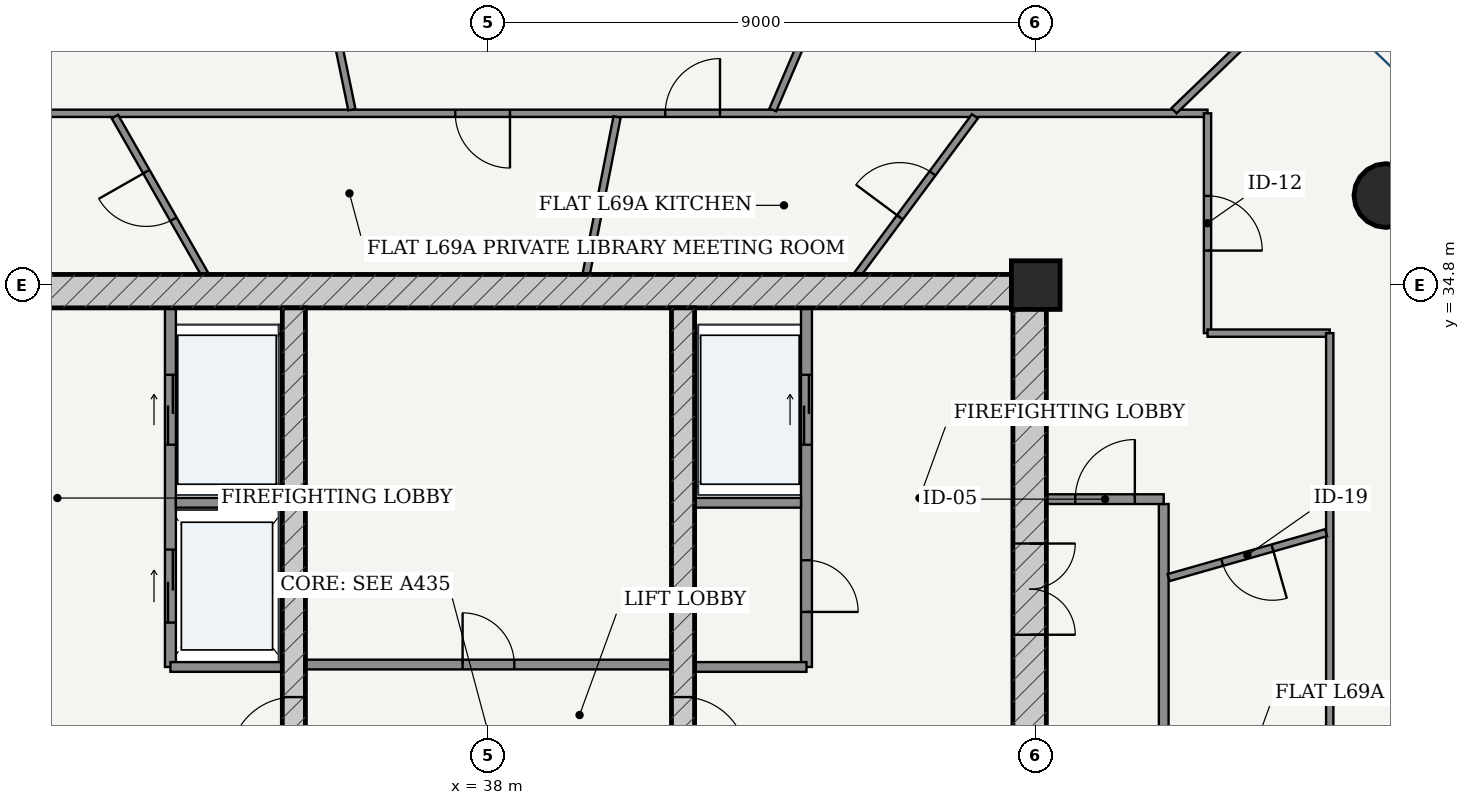
"""IFC4 building model, lengths in metres.
Left out: names, types, materials, properties, quantities, classifications, styles, units other than length and angle.
Written with IfcOpenShell. Run it as: python <this file> out.ifc"""

import sys

from ifc_helpers import new_model, si_unit, direction, frame, frame_2d, origin, origin_2d, place, context, subcontext, project, spatial, rectangle, hollow_circle, extrude, source, transform, mapped, element, fill, save


model = new_model("IFC4")
c1 = context("Model", 3, precision=1e-05, world=origin(), true_north=direction((-0.2419218956, 0.970295726276)))
c2 = subcontext(c1, "Body", "Model", "MODEL_VIEW")
j1 = project(units=[si_unit("LENGTHUNIT", "METRE"), si_unit("PLANEANGLEUNIT", "RADIAN")], contexts=[c1])
p1 = place(None, origin())
s1 = spatial("IfcSite", under=j1, at=p1, CompositionType="ELEMENT")
p2 = place(p1, origin())
s2 = spatial("IfcBuilding", under=s1, at=p2, CompositionType="ELEMENT")
p3 = place(p2, frame((0.0, 0.0, 263.2)))
s3 = spatial("IfcBuildingStorey", under=s2, at=p3, CompositionType="ELEMENT", Elevation=263.2)
p4 = place(p3, frame((47.0, 34.8, 0.0), z_axis=(0.0, 0.0, 1.0), x_axis=(1.0, 0.0, 0.0)))
e1 = element("IfcColumn", 1, at=p4, inside=s3, PredefinedType="COLUMN", context=c2, shape_type="SweptSolid", body=[
    extrude(rectangle(XDim=0.8, YDim=0.8, at=origin_2d()), origin(), (0.0, 0.0, 1.0), 3.75),
])
p5 = place(p3, frame((28.825, 34.7, 0.0), z_axis=(0.0, 0.0, 1.0), x_axis=(1.0, 0.0, 0.0)))
e2 = element("IfcWall", 2, at=p5, inside=s3, PredefinedType="SHEAR", context=c2, shape_type="SweptSolid", body=[
    extrude(rectangle(XDim=18.35, YDim=0.55, at=frame_2d((9.175, 0.0))), origin(), (0.0, 0.0, 1.0), 3.49),
])
p6 = place(p3, frame((46.9, 19.175, 0.0), z_axis=(0.0, 0.0, 1.0), x_axis=(0.0, 1.0, 0.0)))
e3 = element("IfcWall", 3, at=p6, inside=s3, PredefinedType="SHEAR", context=c2, shape_type="SweptSolid", body=[
    extrude(rectangle(XDim=15.25, YDim=0.55, at=frame_2d((7.625, 0.0))), origin(), (0.0, 0.0, 1.0), 3.49),
])
p7 = place(p6, frame((9.875, 0.0, 0.0)))
e4 = element("IfcOpeningElement", 4, at=p7, cuts=e3, PredefinedType="OPENING", context=c2, shape_type="SweptSolid", body=[
    extrude(rectangle(XDim=1.5, YDim=2.2, at=frame_2d((0.75, 1.1))), frame((0.0, 0.285, 0.0), z_axis=(0.0, -1.0, 0.0), x_axis=(1.0, 0.0, 0.0)), (0.0, 0.0, 1.0), 0.57),
])
p8 = place(p3, frame((34.8, 19.175, 0.0), z_axis=(0.0, 0.0, 1.0), x_axis=(0.0, 1.0, 0.0)))
e5 = element("IfcWall", 5, at=p8, inside=s3, PredefinedType="SHEAR", context=c2, shape_type="SweptSolid", body=[
    extrude(rectangle(XDim=15.25, YDim=0.38, at=frame_2d((7.625, 0.0))), origin(), (0.0, 0.0, 1.0), 3.49),
])
p9 = place(p8, frame((7.8, 0.0, 0.0)))
e6 = element("IfcOpeningElement", 6, at=p9, cuts=e5, PredefinedType="OPENING", context=c2, shape_type="SweptSolid", body=[
    extrude(rectangle(XDim=1.05, YDim=2.15, at=frame_2d((0.525, 1.075))), frame((0.0, 0.2, 0.0), z_axis=(0.0, -1.0, 0.0), x_axis=(1.0, 0.0, 0.0)), (0.0, 0.0, 1.0), 0.4),
])
p10 = place(p3, frame((41.2, 19.175, 0.0), z_axis=(0.0, 0.0, 1.0), x_axis=(0.0, 1.0, 0.0)))
e7 = element("IfcWall", 7, at=p10, inside=s3, PredefinedType="SHEAR", context=c2, shape_type="SweptSolid", body=[
    extrude(rectangle(XDim=15.25, YDim=0.38, at=frame_2d((7.625, 0.0))), origin(), (0.0, 0.0, 1.0), 3.49),
])
p11 = place(p10, frame((7.8, 0.0, 0.0)))
e8 = element("IfcOpeningElement", 8, at=p11, cuts=e7, PredefinedType="OPENING", context=c2, shape_type="SweptSolid", body=[
    extrude(rectangle(XDim=1.05, YDim=2.15, at=frame_2d((0.525, 1.075))), frame((0.0, 0.2, 0.0), z_axis=(0.0, -1.0, 0.0), x_axis=(1.0, 0.0, 0.0)), (0.0, 0.0, 1.0), 0.4),
])
p12 = place(p3, frame((52.759, 36.272, 0.0), z_axis=(0.0, 0.0, 1.0), x_axis=(1.0, 0.0, 0.0)))
e9 = element("IfcColumn", 9, at=p12, inside=s3, PredefinedType="COLUMN", context=c2, shape_type="SweptSolid", body=[
    extrude(hollow_circle(Radius=0.525, WallThickness=0.035, at=origin_2d()), origin(), (0.0, 0.0, 1.0), 3.75),
])
p13 = place(p3, frame((32.77, 28.52, 0.0), z_axis=(0.0, 0.0, 1.0), x_axis=(0.0, 1.0, 0.0)))
e10 = element("IfcWall", 10, at=p13, inside=s3, PredefinedType="PARTITIONING", context=c2, shape_type="SweptSolid", body=[
    extrude(rectangle(XDim=5.905, YDim=0.18, at=frame_2d((2.953, 0.0))), origin(), (0.0, 0.0, 1.0), 3.49),
])
p14 = place(p13, frame((3.655, 0.0, 0.0)))
e11 = element("IfcOpeningElement", 11, at=p14, cuts=e10, PredefinedType="OPENING", context=c2, shape_type="SweptSolid", body=[
    extrude(rectangle(XDim=1.15, YDim=2.2, at=frame_2d((0.575, 1.1))), frame((0.0, 0.1, 0.0), z_axis=(0.0, -1.0, 0.0), x_axis=(1.0, 0.0, 0.0)), (0.0, 0.0, 1.0), 0.2),
])
p15 = place(p13, frame((0.73, 0.0, 0.0)))
e12 = element("IfcOpeningElement", 12, at=p15, cuts=e10, PredefinedType="OPENING", context=c2, shape_type="SweptSolid", body=[
    extrude(rectangle(XDim=1.2, YDim=2.25, at=frame_2d((0.6, 1.125))), frame((0.0, 0.1, 0.0), z_axis=(0.0, -1.0, 0.0), x_axis=(1.0, 0.0, 0.0)), (0.0, 0.0, 1.0), 0.2),
])
p16 = place(p3, frame((32.86, 31.22, 0.0), z_axis=(0.0, 0.0, 1.0), x_axis=(1.0, 0.0, 0.0)))
e13 = element("IfcWall", 13, at=p16, inside=s3, PredefinedType="PARTITIONING", context=c2, shape_type="SweptSolid", body=[
    extrude(rectangle(XDim=1.75, YDim=0.16, at=frame_2d((0.875, 0.0))), origin(), (0.0, 0.0, 1.0), 3.49),
])
p17 = place(p3, frame((32.77, 28.52, 0.0), z_axis=(0.0, 0.0, 1.0), x_axis=(1.0, 0.0, 0.0)))
e14 = element("IfcWall", 14, at=p17, inside=s3, PredefinedType="PARTITIONING", context=c2, shape_type="SweptSolid", body=[
    extrude(rectangle(XDim=1.84, YDim=0.16, at=frame_2d((0.92, 0.0))), origin(), (0.0, 0.0, 1.0), 3.49),
])
p18 = place(p3, frame((43.23, 28.52, 0.0), z_axis=(0.0, 0.0, 1.0), x_axis=(0.0, 1.0, 0.0)))
e15 = element("IfcWall", 15, at=p18, inside=s3, PredefinedType="PARTITIONING", context=c2, shape_type="SweptSolid", body=[
    extrude(rectangle(XDim=5.905, YDim=0.18, at=frame_2d((2.953, 0.0))), origin(), (0.0, 0.0, 1.0), 3.49),
])
p19 = place(p18, frame((0.905, 0.0, 0.0)))
e16 = element("IfcOpeningElement", 16, at=p19, cuts=e15, PredefinedType="OPENING", context=c2, shape_type="SweptSolid", body=[
    extrude(rectangle(XDim=0.85, YDim=2.1, at=frame_2d((0.425, 1.05))), frame((0.0, 0.1, 0.0), z_axis=(0.0, -1.0, 0.0), x_axis=(1.0, 0.0, 0.0)), (0.0, 0.0, 1.0), 0.2),
])
p20 = place(p18, frame((3.655, 0.0, 0.0)))
e17 = element("IfcOpeningElement", 17, at=p20, cuts=e15, PredefinedType="OPENING", context=c2, shape_type="SweptSolid", body=[
    extrude(rectangle(XDim=1.15, YDim=2.2, at=frame_2d((0.575, 1.1))), frame((0.0, 0.1, 0.0), z_axis=(0.0, -1.0, 0.0), x_axis=(1.0, 0.0, 0.0)), (0.0, 0.0, 1.0), 0.2),
])
p21 = place(p3, frame((41.39, 31.22, 0.0), z_axis=(0.0, 0.0, 1.0), x_axis=(1.0, 0.0, 0.0)))
e18 = element("IfcWall", 18, at=p21, inside=s3, PredefinedType="PARTITIONING", context=c2, shape_type="SweptSolid", body=[
    extrude(rectangle(XDim=1.75, YDim=0.16, at=frame_2d((0.875, 0.0))), origin(), (0.0, 0.0, 1.0), 3.49),
])
p22 = place(p3, frame((41.39, 28.52, 0.0), z_axis=(0.0, 0.0, 1.0), x_axis=(1.0, 0.0, 0.0)))
e19 = element("IfcWall", 19, at=p22, inside=s3, PredefinedType="PARTITIONING", context=c2, shape_type="SweptSolid", body=[
    extrude(rectangle(XDim=1.84, YDim=0.16, at=frame_2d((0.92, 0.0))), origin(), (0.0, 0.0, 1.0), 3.49),
])
p23 = place(p3, frame((34.99, 28.56, 0.0), z_axis=(0.0, 0.0, 1.0), x_axis=(1.0, 0.0, 0.0)))
e20 = element("IfcWall", 20, at=p23, inside=s3, PredefinedType="PARTITIONING", context=c2, shape_type="SweptSolid", body=[
    extrude(rectangle(XDim=6.02, YDim=0.16, at=frame_2d((3.01, 0.0))), origin(), (0.0, 0.0, 1.0), 3.49),
])
p24 = place(p23, frame((2.585, 0.0, 0.0)))
e21 = element("IfcOpeningElement", 21, at=p24, cuts=e20, PredefinedType="OPENING", context=c2, shape_type="SweptSolid", body=[
    extrude(rectangle(XDim=0.85, YDim=2.1, at=frame_2d((0.425, 1.05))), frame((0.0, 0.09, 0.0), z_axis=(0.0, -1.0, 0.0), x_axis=(1.0, 0.0, 0.0)), (0.0, 0.0, 1.0), 0.18),
])
p25 = place(p3, frame((49.105, 17.275, 0.0), z_axis=(0.0, 0.0, 1.0), x_axis=(0.0, 1.0, 0.0)))
e22 = element("IfcWall", 22, at=p25, inside=s3, PredefinedType="PARTITIONING", context=c2, shape_type="SweptSolid", body=[
    extrude(rectangle(XDim=13.925, YDim=0.16, at=frame_2d((6.962, 0.0))), origin(), (0.0, 0.0, 1.0), 3.015),
])
p26 = place(p25, frame((3.647, 0.0, 0.0)))
e23 = element("IfcOpeningElement", 23, at=p26, cuts=e22, PredefinedType="OPENING", context=c2, shape_type="SweptSolid", body=[
    extrude(rectangle(XDim=0.98, YDim=2.2, at=frame_2d((0.49, 1.1))), frame((0.0, 0.09, 0.0), z_axis=(0.0, -1.0, 0.0), x_axis=(1.0, 0.0, 0.0)), (0.0, 0.0, 1.0), 0.18),
])
p27 = place(p3, frame((47.175, 31.28, 0.0), z_axis=(0.0, 0.0, 1.0), x_axis=(1.0, 0.0, 0.0)))
e24 = element("IfcWall", 24, at=p27, inside=s3, PredefinedType="PARTITIONING", context=c2, shape_type="SweptSolid", body=[
    extrude(rectangle(XDim=1.93, YDim=0.16, at=frame_2d((0.965, 0.0))), origin(), (0.0, 0.0, 1.0), 3.49),
])
p28 = place(p27, frame((0.475, 0.0, 0.0)))
e25 = element("IfcOpeningElement", 25, at=p28, cuts=e24, PredefinedType="OPENING", context=c2, shape_type="SweptSolid", body=[
    extrude(rectangle(XDim=0.98, YDim=2.2, at=frame_2d((0.49, 1.1))), frame((0.0, 0.09, 0.0), z_axis=(0.0, -1.0, 0.0), x_axis=(1.0, 0.0, 0.0)), (0.0, 0.0, 1.0), 0.18),
])
p29 = place(p3, frame((26.175, 37.625, 0.0), z_axis=(0.0, 0.0, 1.0), x_axis=(1.0, 0.0, 0.0)))
e26 = element("IfcWall", 26, at=p29, inside=s3, PredefinedType="PARTITIONING", context=c2, shape_type="SweptSolid", body=[
    extrude(rectangle(XDim=23.65, YDim=0.12, at=frame_2d((11.825, 0.0))), origin(), (0.0, 0.0, 1.0), 3.015),
])
p30 = place(p29, frame((14.733, 0.0, 0.0)))
e27 = element("IfcOpeningElement", 27, at=p30, cuts=e26, PredefinedType="OPENING", context=c2, shape_type="SweptSolid", body=[
    extrude(rectangle(XDim=0.9, YDim=2.15, at=frame_2d((0.45, 1.075))), frame((0.0, 0.07, 0.0), z_axis=(0.0, -1.0, 0.0), x_axis=(1.0, 0.0, 0.0)), (0.0, 0.0, 1.0), 0.14),
])
p31 = place(p29, frame((11.279, 0.0, 0.0)))
e28 = element("IfcOpeningElement", 28, at=p31, cuts=e26, PredefinedType="OPENING", context=c2, shape_type="SweptSolid", body=[
    extrude(rectangle(XDim=0.9, YDim=2.15, at=frame_2d((0.45, 1.075))), frame((0.0, 0.07, 0.0), z_axis=(0.0, -1.0, 0.0), x_axis=(1.0, 0.0, 0.0)), (0.0, 0.0, 1.0), 0.14),
])
p32 = place(p29, frame((2.678, 0.0, 0.0)))
e29 = element("IfcOpeningElement", 29, at=p32, cuts=e26, PredefinedType="OPENING", context=c2, shape_type="SweptSolid", body=[
    extrude(rectangle(XDim=0.9, YDim=2.15, at=frame_2d((0.45, 1.075))), frame((0.0, 0.07, 0.0), z_axis=(0.0, -1.0, 0.0), x_axis=(1.0, 0.0, 0.0)), (0.0, 0.0, 1.0), 0.14),
])
p33 = place(p3, frame((49.825, 37.625, 0.0), z_axis=(0.0, 0.0, 1.0), x_axis=(0.0, -1.0, 0.0)))
e30 = element("IfcWall", 30, at=p33, inside=s3, PredefinedType="PARTITIONING", context=c2, shape_type="SweptSolid", body=[
    extrude(rectangle(XDim=3.615, YDim=0.12, at=frame_2d((1.808, 0.0))), origin(), (0.0, 0.0, 1.0), 3.015),
])
p34 = place(p33, frame((1.357, 0.0, 0.0)))
e31 = element("IfcOpeningElement", 31, at=p34, cuts=e30, PredefinedType="OPENING", context=c2, shape_type="SweptSolid", body=[
    extrude(rectangle(XDim=0.9, YDim=2.15, at=frame_2d((0.45, 1.075))), frame((0.0, 0.07, 0.0), z_axis=(0.0, -1.0, 0.0), x_axis=(1.0, 0.0, 0.0)), (0.0, 0.0, 1.0), 0.14),
])
p35 = place(p3, frame((49.825, 34.01, 0.0), z_axis=(0.0, 0.0, 1.0), x_axis=(1.0, 0.0, 0.0)))
e32 = element("IfcWall", 32, at=p35, inside=s3, PredefinedType="PARTITIONING", context=c2, shape_type="SweptSolid", body=[
    extrude(rectangle(XDim=2.01, YDim=0.12, at=frame_2d((1.005, 0.0))), origin(), (0.0, 0.0, 1.0), 3.209),
])
p36 = place(p3, frame((51.835, 34.01, 0.0), z_axis=(0.0, 0.0, 1.0), x_axis=(0.0, -1.0, 0.0)))
e33 = element("IfcWall", 33, at=p36, inside=s3, PredefinedType="PARTITIONING", context=c2, shape_type="SweptSolid", body=[
    extrude(rectangle(XDim=9.761, YDim=0.12, at=frame_2d((4.88, 0.0))), origin(), (0.0, 0.0, 1.0), 3.015),
])
p37 = place(p3, frame((49.275, 37.668, 0.0), z_axis=(0.0, 0.0, 1.0), x_axis=(0.719954096891, 0.694021684366, 0.0)))
e34 = element("IfcWall", 34, at=p37, inside=s3, PredefinedType="PARTITIONING", context=c2, shape_type="SweptSolid", body=[
    extrude(rectangle(XDim=3.333, YDim=0.12, at=frame_2d((1.667, 0.0))), origin(), (0.0, 0.0, 1.0), 3.121),
])
p38 = place(p3, frame((42.676, 37.682, 0.0), z_axis=(0.0, 0.0, 1.0), x_axis=(0.394777489933, 0.918776759307, 0.0)))
e35 = element("IfcWall", 35, at=p38, inside=s3, PredefinedType="PARTITIONING", context=c2, shape_type="SweptSolid", body=[
    extrude(rectangle(XDim=6.9, YDim=0.12, at=frame_2d((3.45, 0.0))), origin(), (0.0, 0.0, 1.0), 3.121),
])
p39 = place(p38, frame((3.0, 0.0, 0.0)))
e36 = element("IfcOpeningElement", 36, at=p39, cuts=e35, PredefinedType="OPENING", context=c2, shape_type="SweptSolid", body=[
    extrude(rectangle(XDim=0.9, YDim=2.15, at=frame_2d((0.45, 1.075))), frame((0.0, 0.07, 0.0), z_axis=(0.0, -1.0, 0.0), x_axis=(1.0, 0.0, 0.0)), (0.0, 0.0, 1.0), 0.14),
])
p40 = place(p3, frame((35.754, 37.686, 0.0), z_axis=(0.0, 0.0, 1.0), x_axis=(-0.202105877204, 0.979363678313, 0.0)))
e37 = element("IfcWall", 37, at=p40, inside=s3, PredefinedType="PARTITIONING", context=c2, shape_type="SweptSolid", body=[
    extrude(rectangle(XDim=7.512, YDim=0.12, at=frame_2d((3.756, 0.0))), origin(), (0.0, 0.0, 1.0), 3.015),
])
p41 = place(p3, frame((49.185, 29.99, 0.0), z_axis=(0.0, 0.0, 1.0), x_axis=(0.961653809431, 0.274266204273, 0.0)))
e38 = element("IfcWall", 38, at=p41, inside=s3, PredefinedType="PARTITIONING", context=c2, shape_type="SweptSolid", body=[
    extrude(rectangle(XDim=2.694, YDim=0.12, at=frame_2d((1.347, 0.0))), origin(), (0.0, 0.0, 1.0), 3.209),
])
p42 = place(p41, frame((0.917, 0.0, 0.0)))
e39 = element("IfcOpeningElement", 39, at=p42, cuts=e38, PredefinedType="OPENING", context=c2, shape_type="SweptSolid", body=[
    extrude(rectangle(XDim=0.86, YDim=2.15, at=frame_2d((0.43, 1.075))), frame((0.0, 0.07, 0.0), z_axis=(0.0, -1.0, 0.0), x_axis=(1.0, 0.0, 0.0)), (0.0, 0.0, 1.0), 0.14),
])
p43 = place(p3, frame((44.07, 34.977, 0.0), z_axis=(0.0, 0.0, 1.0), x_axis=(0.596033679783, 0.802959433947, 0.0)))
e40 = element("IfcWall", 40, at=p43, inside=s3, PredefinedType="PARTITIONING", context=c2, shape_type="SweptSolid", body=[
    extrude(rectangle(XDim=3.236, YDim=0.12, at=frame_2d((1.618, 0.0))), origin(), (0.0, 0.0, 1.0), 3.49),
])
p44 = place(p43, frame((1.168, 0.0, 0.0)))
e41 = element("IfcOpeningElement", 41, at=p44, cuts=e40, PredefinedType="OPENING", context=c2, shape_type="SweptSolid", body=[
    extrude(rectangle(XDim=0.9, YDim=2.15, at=frame_2d((0.45, 1.075))), frame((0.0, 0.07, 0.0), z_axis=(0.0, -1.0, 0.0), x_axis=(1.0, 0.0, 0.0)), (0.0, 0.0, 1.0), 0.14),
])
p45 = place(p3, frame((39.607, 34.977, 0.0), z_axis=(0.0, 0.0, 1.0), x_axis=(0.192785105701, 0.981241001497, 0.0)))
e42 = element("IfcWall", 42, at=p45, inside=s3, PredefinedType="PARTITIONING", context=c2, shape_type="SweptSolid", body=[
    extrude(rectangle(XDim=2.637, YDim=0.12, at=frame_2d((1.318, 0.0))), origin(), (0.0, 0.0, 1.0), 2.575),
])
p46 = place(p3, frame((33.336, 34.977, 0.0), z_axis=(0.0, 0.0, 1.0), x_axis=(-0.495399243909, 0.868665406894, 0.0)))
e43 = element("IfcWall", 43, at=p46, inside=s3, PredefinedType="PARTITIONING", context=c2, shape_type="SweptSolid", body=[
    extrude(rectangle(XDim=2.987, YDim=0.12, at=frame_2d((1.493, 0.0))), origin(), (0.0, 0.0, 1.0), 3.49),
])
p47 = place(p46, frame((1.043, 0.0, 0.0)))
e44 = element("IfcOpeningElement", 44, at=p47, cuts=e43, PredefinedType="OPENING", context=c2, shape_type="SweptSolid", body=[
    extrude(rectangle(XDim=0.9, YDim=2.15, at=frame_2d((0.45, 1.075))), frame((0.0, 0.07, 0.0), z_axis=(0.0, -1.0, 0.0), x_axis=(1.0, 0.0, 0.0)), (0.0, 0.0, 1.0), 0.14),
])
m1 = source(origin(), c2, "Body", "SweptSolid", [
    extrude(rectangle(XDim=1.5, YDim=2.2, at=frame_2d((0.75, 1.1))), frame((0.0, 0.025, 0.0), z_axis=(0.0, -1.0, 0.0), x_axis=(1.0, 0.0, 0.0)), (0.0, 0.0, 1.0), 0.05),
])
p48 = place(p7, frame((1.5, 0.0, 0.0), z_axis=(0.0, 0.0, 1.0), x_axis=(-1.0, 0.0, 0.0)))
e45 = element("IfcDoor", 45, at=p48, inside=s3, OperationType="DOUBLE_DOOR_SINGLE_SWING", PredefinedType="DOOR", context=c2, shape_type="MappedRepresentation", body=[
    mapped(m1, transform((0.0, 0.0, 0.0), scale=1.0)),
])
fill(e4, e45)
m2 = source(origin(), c2, "Body", "SweptSolid", [
    extrude(rectangle(XDim=1.05, YDim=2.15, at=frame_2d((0.525, 1.075))), frame((0.0, 0.025, 0.0), z_axis=(0.0, -1.0, 0.0), x_axis=(1.0, 0.0, 0.0)), (0.0, 0.0, 1.0), 0.05),
])
p49 = place(p9, origin())
e46 = element("IfcDoor", 46, at=p49, inside=s3, OperationType="SINGLE_SWING_LEFT", PredefinedType="DOOR", context=c2, shape_type="MappedRepresentation", body=[
    mapped(m2, transform((0.0, 0.0, 0.0), scale=1.0)),
])
fill(e6, e46)
p50 = place(p11, frame((1.05, 0.0, 0.0), z_axis=(0.0, 0.0, 1.0), x_axis=(-1.0, 0.0, 0.0)))
e47 = element("IfcDoor", 47, at=p50, inside=s3, OperationType="SINGLE_SWING_RIGHT", PredefinedType="DOOR", context=c2, shape_type="MappedRepresentation", body=[
    mapped(m2, transform((0.0, 0.0, 0.0), scale=1.0)),
])
fill(e8, e47)
m3 = source(origin(), c2, "Body", "SweptSolid", [
    extrude(rectangle(XDim=0.85, YDim=2.1, at=frame_2d((0.425, 1.05))), frame((0.0, 0.025, 0.0), z_axis=(0.0, -1.0, 0.0), x_axis=(1.0, 0.0, 0.0)), (0.0, 0.0, 1.0), 0.05),
])
p51 = place(p19, frame((0.85, 0.0, 0.0), z_axis=(0.0, 0.0, 1.0), x_axis=(-1.0, 0.0, 0.0)))
e48 = element("IfcDoor", 48, at=p51, inside=s3, OperationType="SINGLE_SWING_RIGHT", PredefinedType="DOOR", context=c2, shape_type="MappedRepresentation", body=[
    mapped(m3, transform((0.0, 0.0, 0.0), scale=1.0)),
])
fill(e16, e48)
p52 = place(p24, origin())
e49 = element("IfcDoor", 49, at=p52, inside=s3, OperationType="SINGLE_SWING_LEFT", PredefinedType="DOOR", context=c2, shape_type="MappedRepresentation", body=[
    mapped(m3, transform((0.0, 0.0, 0.0), scale=1.0)),
])
fill(e21, e49)
m4 = source(origin(), c2, "Body", "SweptSolid", [
    extrude(rectangle(XDim=1.15, YDim=2.2, at=frame_2d((0.575, 1.1))), frame((0.0, 0.025, 0.0), z_axis=(0.0, -1.0, 0.0), x_axis=(1.0, 0.0, 0.0)), (0.0, 0.0, 1.0), 0.05),
])
p53 = place(p14, origin())
e50 = element("IfcDoor", 50, at=p53, inside=s3, OperationType="DOUBLE_DOOR_SLIDING", PredefinedType="DOOR", context=c2, shape_type="MappedRepresentation", body=[
    mapped(m4, transform((0.0, 0.0, 0.0), scale=1.0)),
])
fill(e11, e50)
p54 = place(p20, origin())
e51 = element("IfcDoor", 51, at=p54, inside=s3, OperationType="DOUBLE_DOOR_SLIDING", PredefinedType="DOOR", context=c2, shape_type="MappedRepresentation", body=[
    mapped(m4, transform((0.0, 0.0, 0.0), scale=1.0)),
])
fill(e17, e51)
m5 = source(origin(), c2, "Body", "SweptSolid", [
    extrude(rectangle(XDim=1.2, YDim=2.25, at=frame_2d((0.6, 1.125))), frame((0.0, 0.025, 0.0), z_axis=(0.0, -1.0, 0.0), x_axis=(1.0, 0.0, 0.0)), (0.0, 0.0, 1.0), 0.05),
])
p55 = place(p15, origin())
e52 = element("IfcDoor", 52, at=p55, inside=s3, OperationType="DOUBLE_DOOR_SLIDING", PredefinedType="DOOR", context=c2, shape_type="MappedRepresentation", body=[
    mapped(m5, transform((0.0, 0.0, 0.0), scale=1.0)),
])
fill(e12, e52)
m6 = source(origin(), c2, "Body", "SweptSolid", [
    extrude(rectangle(XDim=0.98, YDim=2.2, at=frame_2d((0.49, 1.1))), frame((0.0, 0.025, 0.0), z_axis=(0.0, -1.0, 0.0), x_axis=(1.0, 0.0, 0.0)), (0.0, 0.0, 1.0), 0.05),
])
p56 = place(p28, origin())
e53 = element("IfcDoor", 53, at=p56, inside=s3, OperationType="SINGLE_SWING_RIGHT", PredefinedType="DOOR", context=c2, shape_type="MappedRepresentation", body=[
    mapped(m6, transform((0.0, 0.0, 0.0), scale=1.0)),
])
fill(e25, e53)
m7 = source(origin(), c2, "Body", "SweptSolid", [
    extrude(rectangle(XDim=0.86, YDim=2.15, at=frame_2d((0.43, 1.075))), frame((0.0, 0.025, 0.0), z_axis=(0.0, -1.0, 0.0), x_axis=(1.0, 0.0, 0.0)), (0.0, 0.0, 1.0), 0.05),
])
p57 = place(p42, frame((0.86, 0.0, 0.0), z_axis=(0.0, 0.0, 1.0), x_axis=(-1.0, 0.0, 0.0)))
e54 = element("IfcDoor", 54, at=p57, inside=s3, OperationType="SINGLE_SWING_LEFT", PredefinedType="DOOR", context=c2, shape_type="MappedRepresentation", body=[
    mapped(m7, transform((0.0, 0.0, 0.0), scale=1.0)),
])
fill(e39, e54)
m8 = source(origin(), c2, "Body", "SweptSolid", [
    extrude(rectangle(XDim=0.9, YDim=2.15, at=frame_2d((0.45, 1.075))), frame((0.0, 0.025, 0.0), z_axis=(0.0, -1.0, 0.0), x_axis=(1.0, 0.0, 0.0)), (0.0, 0.0, 1.0), 0.05),
])
p58 = place(p34, origin())
e55 = element("IfcDoor", 55, at=p58, inside=s3, OperationType="SINGLE_SWING_RIGHT", PredefinedType="DOOR", context=c2, shape_type="MappedRepresentation", body=[
    mapped(m8, transform((0.0, 0.0, 0.0), scale=1.0)),
])
fill(e31, e55)
p59 = place(p44, origin())
e56 = element("IfcDoor", 56, at=p59, inside=s3, OperationType="SINGLE_SWING_LEFT", PredefinedType="DOOR", context=c2, shape_type="MappedRepresentation", body=[
    mapped(m8, transform((0.0, 0.0, 0.0), scale=1.0)),
])
fill(e41, e56)
p60 = place(p30, origin())
e57 = element("IfcDoor", 57, at=p60, inside=s3, OperationType="SINGLE_SWING_RIGHT", PredefinedType="DOOR", context=c2, shape_type="MappedRepresentation", body=[
    mapped(m8, transform((0.0, 0.0, 0.0), scale=1.0)),
])
fill(e27, e57)
p61 = place(p31, frame((0.9, 0.0, 0.0), z_axis=(0.0, 0.0, 1.0), x_axis=(-1.0, 0.0, 0.0)))
e58 = element("IfcDoor", 58, at=p61, inside=s3, OperationType="SINGLE_SWING_LEFT", PredefinedType="DOOR", context=c2, shape_type="MappedRepresentation", body=[
    mapped(m8, transform((0.0, 0.0, 0.0), scale=1.0)),
])
fill(e28, e58)
p62 = place(p47, origin())
e59 = element("IfcDoor", 59, at=p62, inside=s3, OperationType="SINGLE_SWING_RIGHT", PredefinedType="DOOR", context=c2, shape_type="MappedRepresentation", body=[
    mapped(m8, transform((0.0, 0.0, 0.0), scale=1.0)),
])
fill(e44, e59)
save(model, sys.argv[1])
